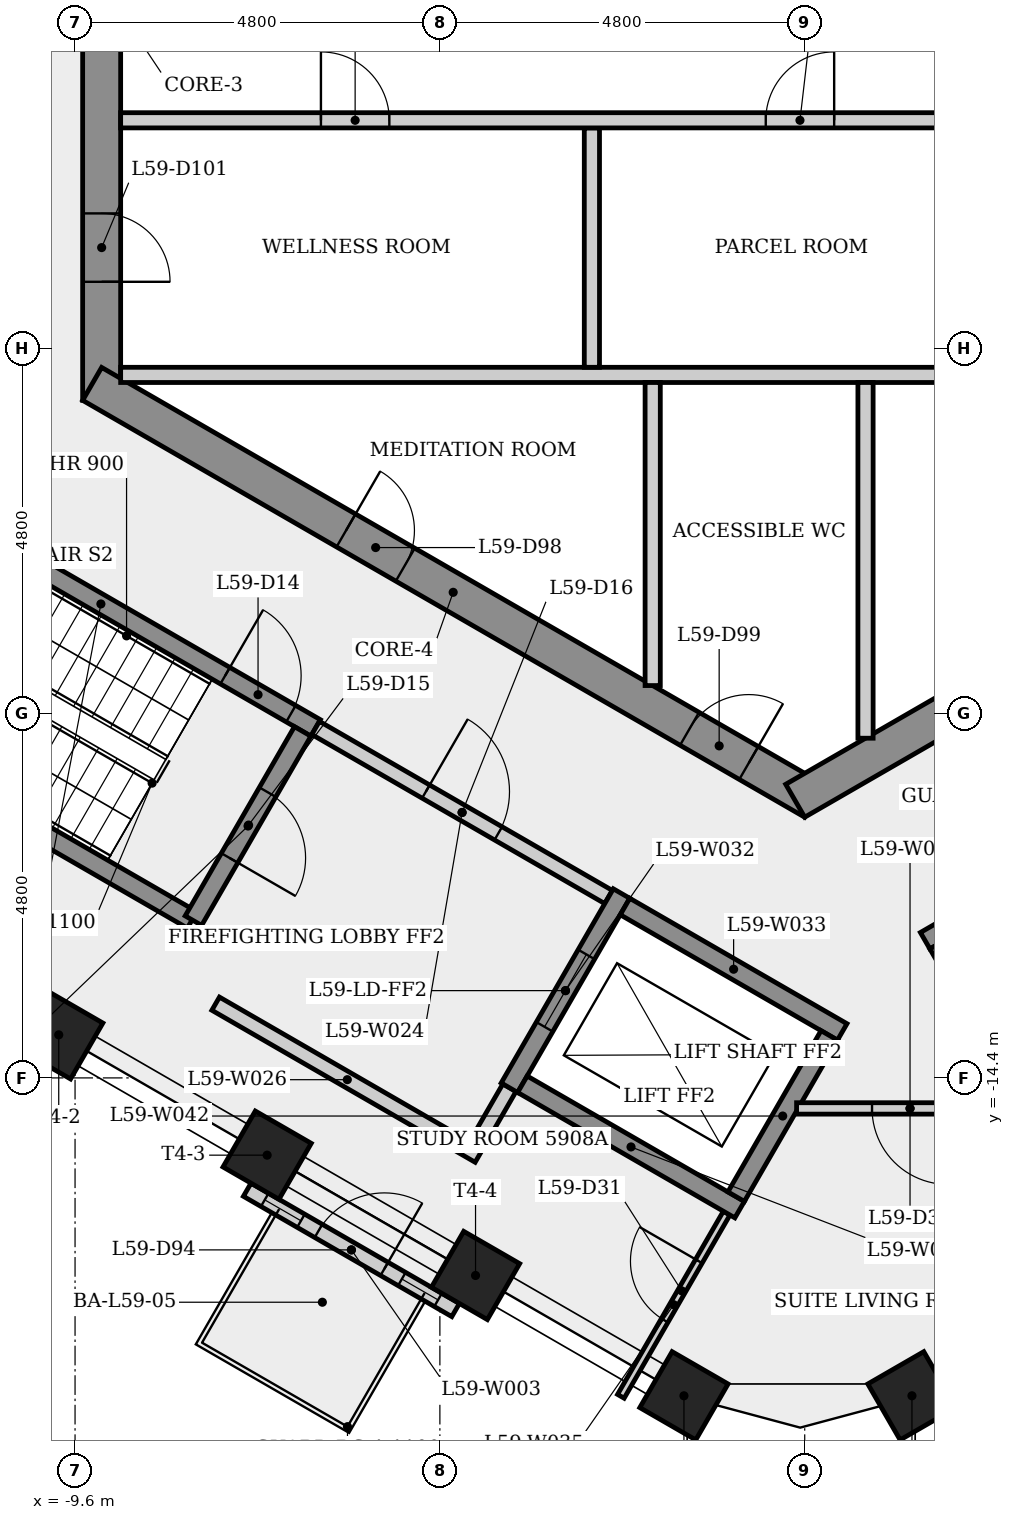
"""IFC4 building model, lengths in metres.
Left out: names, types, materials, properties, quantities, classifications, styles, units other than length and angle.
Written with IfcOpenShell. Run it as: python <this file> out.ifc"""

import sys

from ifc_helpers import new_model, si_unit, direction, frame, frame_2d, origin, origin_2d, place, context, subcontext, project, spatial, rectangle, extrude, element, fill, save


model = new_model("IFC4")
c1 = context("Model", 3, precision=1e-05, world=origin(), true_north=direction((0.0, 1.0)))
c2 = subcontext(c1, "Body", "Model", "MODEL_VIEW")
j1 = project(units=[si_unit("LENGTHUNIT", "METRE"), si_unit("PLANEANGLEUNIT", "RADIAN")], contexts=[c1])
p1 = place(None, origin())
s1 = spatial("IfcSite", under=j1, at=p1, CompositionType="ELEMENT")
p2 = place(p1, origin())
s2 = spatial("IfcBuilding", under=s1, at=p2, CompositionType="ELEMENT")
p3 = place(p2, frame((0.0, 0.0, 222.3)))
s3 = spatial("IfcBuildingStorey", under=s2, at=p3, CompositionType="ELEMENT", Elevation=222.3)
p4 = place(p3, frame((-9.25, 5.485, 0.0), z_axis=(0.0, 0.0, 1.0), x_axis=(0.0, -1.0, 0.0)))
e1 = element("IfcWall", 1, at=p4, inside=s3, PredefinedType="SHEAR", context=c2, shape_type="SweptSolid", body=[
    extrude(rectangle(XDim=10.97, YDim=0.5, at=frame_2d((5.485, 0.0))), origin(), (0.0, 0.0, 1.0), 3.4),
])
p5 = place(p4, frame((8.51, 0.0, 0.0)))
e2 = element("IfcOpeningElement", 2, at=p5, cuts=e1, PredefinedType="OPENING", context=c2, shape_type="SweptSolid", body=[
    extrude(rectangle(XDim=0.9, YDim=2.1, at=frame_2d((0.45, 1.05))), frame((0.0, 0.26, 0.0), z_axis=(0.0, -1.0, 0.0), x_axis=(1.0, 0.0, 0.0)), (0.0, 0.0, 1.0), 0.52),
])
p6 = place(p4, frame((4.685, 0.0, 0.0)))
e3 = element("IfcOpeningElement", 3, at=p6, cuts=e1, PredefinedType="OPENING", context=c2, shape_type="SweptSolid", body=[
    extrude(rectangle(XDim=1.6, YDim=2.1, at=frame_2d((0.8, 1.05))), frame((0.0, 0.26, 0.0), z_axis=(0.0, -1.0, 0.0), x_axis=(1.0, 0.0, 0.0)), (0.0, 0.0, 1.0), 0.52),
])
p7 = place(p3, frame((-9.375, -5.268, 0.0), z_axis=(0.0, 0.0, 1.0), x_axis=(0.866023993627, -0.500002442456, 0.0)))
e4 = element("IfcWall", 4, at=p7, inside=s3, PredefinedType="SHEAR", context=c2, shape_type="SweptSolid", body=[
    extrude(rectangle(XDim=10.97, YDim=0.5, at=frame_2d((5.485, 0.0))), origin(), (0.0, 0.0, 1.0), 3.4),
])
p8 = place(p7, frame((3.857, 0.0, 0.0)))
e5 = element("IfcOpeningElement", 5, at=p8, cuts=e4, PredefinedType="OPENING", context=c2, shape_type="SweptSolid", body=[
    extrude(rectangle(XDim=0.9, YDim=2.1, at=frame_2d((0.45, 1.05))), frame((0.0, 0.26, 0.0), z_axis=(0.0, -1.0, 0.0), x_axis=(1.0, 0.0, 0.0)), (0.0, 0.0, 1.0), 0.52),
])
p9 = place(p7, frame((9.076, 0.0, 0.0)))
e6 = element("IfcOpeningElement", 6, at=p9, cuts=e4, PredefinedType="OPENING", context=c2, shape_type="SweptSolid", body=[
    extrude(rectangle(XDim=0.9, YDim=2.1, at=frame_2d((0.45, 1.05))), frame((0.0, 0.26, 0.0), z_axis=(0.0, -1.0, 0.0), x_axis=(1.0, 0.0, 0.0)), (0.0, 0.0, 1.0), 0.52),
])
p10 = place(p3, frame((-0.125, -10.753, 0.0), z_axis=(0.0, 0.0, 1.0), x_axis=(0.866023993627, 0.500002442456, 0.0)))
e7 = element("IfcWall", 7, at=p10, inside=s3, PredefinedType="SHEAR", context=c2, shape_type="SweptSolid", body=[
    extrude(rectangle(XDim=10.97, YDim=0.5, at=frame_2d((5.485, 0.0))), origin(), (0.0, 0.0, 1.0), 3.4),
])
p11 = place(p10, frame((7.195, 0.0, 0.0)))
e8 = element("IfcOpeningElement", 8, at=p11, cuts=e7, PredefinedType="OPENING", context=c2, shape_type="SweptSolid", body=[
    extrude(rectangle(XDim=0.9, YDim=2.1, at=frame_2d((0.45, 1.05))), frame((0.0, 0.26, 0.0), z_axis=(0.0, -1.0, 0.0), x_axis=(1.0, 0.0, 0.0)), (0.0, 0.0, 1.0), 0.52),
])
for number, where, z_axis, x_axis in (
    (9, (-9.815, -13.833, 0.0), (0.0, 0.0, 1.0), (-0.5, -0.866, 0.0)),
    (10, (-7.073, -15.417, 0.0), (0.0, 0.0, 1.0), (-0.5, -0.866, 0.0)),
    (11, (-4.331, -17.0, 0.0), (0.0, 0.0, 1.0), (-0.5, -0.866, 0.0)),
    (12, (-1.589, -18.583, 0.0), (0.0, 0.0, 1.0), (-0.5, -0.866, 0.0)),
    (13, (1.411, -18.583, 0.0), (0.0, 0.0, 1.0), (0.5, -0.866, 0.0)),
):
    element("IfcColumn", number, at=place(p3, frame(where, z_axis=z_axis, x_axis=x_axis)), inside=s3, PredefinedType="COLUMN", context=c2, shape_type="SweptSolid", body=[
        extrude(rectangle(XDim=0.85, YDim=0.85, at=origin_2d()), origin(), (0.0, 0.0, 1.0), 3.4),
    ])
p12 = place(p3, frame((-7.335, -15.871, 0.0), z_axis=(0.0, 0.0, 1.0), x_axis=(0.866032778651, -0.499987226139, 0.0)))
e14 = element("IfcWall", 14, at=p12, inside=s3, PredefinedType="SOLIDWALL", context=c2, shape_type="SweptSolid", body=[
    extrude(rectangle(XDim=3.166, YDim=0.2, at=frame_2d((1.583, 0.0))), origin(), (0.0, 0.0, 1.0), 3.4),
])
p13 = place(p12, frame((1.083, 0.0, 0.0)))
e15 = element("IfcOpeningElement", 15, at=p13, cuts=e14, PredefinedType="OPENING", context=c2, shape_type="SweptSolid", body=[
    extrude(rectangle(XDim=1.0, YDim=2.4, at=frame_2d((0.5, 1.2))), frame((0.0, 0.11, 0.0), z_axis=(0.0, -1.0, 0.0), x_axis=(1.0, 0.0, 0.0)), (0.0, 0.0, 1.0), 0.22),
])
p14 = place(p12, frame((0.267, 0.0, 0.9)))
e16 = element("IfcOpeningElement", 16, at=p14, cuts=e14, PredefinedType="OPENING", context=c2, shape_type="SweptSolid", body=[
    extrude(rectangle(XDim=0.55, YDim=1.5, at=frame_2d((0.275, 0.75))), frame((0.0, 0.11, 0.0), z_axis=(0.0, -1.0, 0.0), x_axis=(1.0, 0.0, 0.0)), (0.0, 0.0, 1.0), 0.22),
])
p15 = place(p12, frame((2.35, 0.0, 0.9)))
e17 = element("IfcOpeningElement", 17, at=p15, cuts=e14, PredefinedType="OPENING", context=c2, shape_type="SweptSolid", body=[
    extrude(rectangle(XDim=0.55, YDim=1.5, at=frame_2d((0.275, 0.75))), frame((0.0, 0.11, 0.0), z_axis=(0.0, -1.0, 0.0), x_axis=(1.0, 0.0, 0.0)), (0.0, 0.0, 1.0), 0.22),
])
p16 = place(p3, frame((-12.085, -6.532, 0.0), z_axis=(0.0, 0.0, 1.0), x_axis=(0.866031063448, -0.499990197047, 0.0)))
e18 = element("IfcWall", 18, at=p16, inside=s3, PredefinedType="SHEAR", context=c2, shape_type="SweptSolid", body=[
    extrude(rectangle(XDim=6.525, YDim=0.25, at=frame_2d((3.263, 0.0))), origin(), (0.0, 0.0, 1.0), 3.05),
])
p17 = place(p16, frame((5.15, 0.0, 0.0)))
e19 = element("IfcOpeningElement", 19, at=p17, cuts=e18, PredefinedType="OPENING", context=c2, shape_type="SweptSolid", body=[
    extrude(rectangle(XDim=1.0, YDim=2.1, at=frame_2d((0.5, 1.05))), frame((0.0, 0.135, 0.0), z_axis=(0.0, -1.0, 0.0), x_axis=(1.0, 0.0, 0.0)), (0.0, 0.0, 1.0), 0.27),
])
p18 = place(p3, frame((-9.0, -5.15, 0.0), z_axis=(0.0, 0.0, 1.0), x_axis=(1.0, 0.0, 0.0)))
e20 = element("IfcWall", 20, at=p18, inside=s3, PredefinedType="PARTITIONING", context=c2, shape_type="SweptSolid", body=[
    extrude(rectangle(XDim=11.325, YDim=0.2, at=frame_2d((5.663, 0.0))), origin(), (0.0, 0.0, 1.0), 3.05),
])
p19 = place(p3, frame((-8.06, -12.321, 0.0), z_axis=(0.0, 0.0, 1.0), x_axis=(-0.866029591389, 0.499992746786, 0.0)))
e21 = element("IfcWall", 21, at=p19, inside=s3, PredefinedType="SHEAR", context=c2, shape_type="SweptSolid", body=[
    extrude(rectangle(XDim=6.255, YDim=0.25, at=frame_2d((3.127, 0.0))), origin(), (0.0, 0.0, 1.0), 3.05),
])
p20 = place(p3, frame((-6.605, -9.841, 0.0), z_axis=(0.0, 0.0, 1.0), x_axis=(-0.500011588718, -0.866018712932, 0.0)))
e22 = element("IfcWall", 22, at=p20, inside=s3, PredefinedType="SHEAR", context=c2, shape_type="SweptSolid", body=[
    extrude(rectangle(XDim=2.875, YDim=0.25, at=frame_2d((1.438, 0.0))), origin(), (0.0, 0.0, 1.0), 3.05),
])
p21 = place(p20, frame((0.923, 0.0, 0.0)))
e23 = element("IfcOpeningElement", 23, at=p21, cuts=e22, PredefinedType="OPENING", context=c2, shape_type="SweptSolid", body=[
    extrude(rectangle(XDim=1.0, YDim=2.1, at=frame_2d((0.5, 1.05))), frame((0.0, 0.135, 0.0), z_axis=(0.0, -1.0, 0.0), x_axis=(1.0, 0.0, 0.0)), (0.0, 0.0, 1.0), 0.27),
])
p22 = place(p3, frame((-6.435, -9.795, 0.0), z_axis=(0.0, 0.0, 1.0), x_axis=(0.866012907634, -0.500021643343, 0.0)))
e24 = element("IfcWall", 24, at=p22, inside=s3, PredefinedType="PARTITIONING", context=c2, shape_type="SweptSolid", body=[
    extrude(rectangle(XDim=4.45, YDim=0.2, at=frame_2d((2.225, 0.0))), origin(), (0.0, 0.0, 1.0), 3.05),
])
p23 = place(p22, frame((1.675, 0.0, 0.0)))
e25 = element("IfcOpeningElement", 25, at=p23, cuts=e24, PredefinedType="OPENING", context=c2, shape_type="SweptSolid", body=[
    extrude(rectangle(XDim=1.1, YDim=2.1, at=frame_2d((0.55, 1.05))), frame((0.0, 0.11, 0.0), z_axis=(0.0, -1.0, 0.0), x_axis=(1.0, 0.0, 0.0)), (0.0, 0.0, 1.0), 0.22),
])
p24 = place(p3, frame((-4.286, -15.423, 0.0), z_axis=(0.0, 0.0, 1.0), x_axis=(-0.866026010844, 0.49999894854, 0.0)))
e26 = element("IfcWall", 26, at=p24, inside=s3, PredefinedType="PARTITIONING", context=c2, shape_type="SweptSolid", body=[
    extrude(rectangle(XDim=4.0, YDim=0.2, at=frame_2d((2.0, 0.0))), origin(), (0.0, 0.0, 1.0), 3.05),
])
p25 = place(p3, frame((-3.885, -14.529, 0.0), z_axis=(0.0, 0.0, 1.0), x_axis=(-0.499859285417, -0.866106630146, 0.0)))
e27 = element("IfcWall", 27, at=p25, inside=s3, PredefinedType="PARTITIONING", context=c2, shape_type="SweptSolid", body=[
    extrude(rectangle(XDim=0.875, YDim=0.2, at=frame_2d((0.438, 0.0))), origin(), (0.0, 0.0, 1.0), 3.05),
])
p26 = place(p3, frame((-2.8, -1.9, 0.0), z_axis=(0.0, 0.0, 1.0), x_axis=(0.0, -1.0, 0.0)))
e28 = element("IfcWall", 28, at=p26, inside=s3, PredefinedType="PARTITIONING", context=c2, shape_type="SweptSolid", body=[
    extrude(rectangle(XDim=3.15, YDim=0.2, at=frame_2d((1.575, 0.0))), origin(), (0.0, 0.0, 1.0), 3.05),
])
p27 = place(p3, frame((-9.0, -1.8, 0.0), z_axis=(0.0, 0.0, 1.0), x_axis=(1.0, 0.0, 0.0)))
e29 = element("IfcWall", 29, at=p27, inside=s3, PredefinedType="PARTITIONING", context=c2, shape_type="SweptSolid", body=[
    extrude(rectangle(XDim=11.325, YDim=0.2, at=frame_2d((5.663, 0.0))), origin(), (0.0, 0.0, 1.0), 3.05),
])
p28 = place(p27, frame((2.635, 0.0, 0.0)))
e30 = element("IfcOpeningElement", 30, at=p28, cuts=e29, PredefinedType="OPENING", context=c2, shape_type="SweptSolid", body=[
    extrude(rectangle(XDim=0.9, YDim=2.1, at=frame_2d((0.45, 1.05))), frame((0.0, 0.11, 0.0), z_axis=(0.0, -1.0, 0.0), x_axis=(1.0, 0.0, 0.0)), (0.0, 0.0, 1.0), 0.22),
])
p29 = place(p27, frame((8.488, 0.0, 0.0)))
e31 = element("IfcOpeningElement", 31, at=p29, cuts=e29, PredefinedType="OPENING", context=c2, shape_type="SweptSolid", body=[
    extrude(rectangle(XDim=0.9, YDim=2.1, at=frame_2d((0.45, 1.05))), frame((0.0, 0.11, 0.0), z_axis=(0.0, -1.0, 0.0), x_axis=(1.0, 0.0, 0.0)), (0.0, 0.0, 1.0), 0.22),
])
p30 = place(p3, frame((-2.41, -11.974, 0.0), z_axis=(0.0, 0.0, 1.0), x_axis=(-0.500001826776, -0.866024349092, 0.0)))
e32 = element("IfcWall", 32, at=p30, inside=s3, PredefinedType="SHEAR", context=c2, shape_type="SweptSolid", body=[
    extrude(rectangle(XDim=2.95, YDim=0.25, at=frame_2d((1.475, 0.0))), origin(), (0.0, 0.0, 1.0), 3.05),
])
p31 = place(p30, frame((0.925, 0.0, 0.0)))
e33 = element("IfcOpeningElement", 33, at=p31, cuts=e32, PredefinedType="OPENING", context=c2, shape_type="SweptSolid", body=[
    extrude(rectangle(XDim=1.1, YDim=2.1, at=frame_2d((0.55, 1.05))), frame((0.0, 0.135, 0.0), z_axis=(0.0, -1.0, 0.0), x_axis=(1.0, 0.0, 0.0)), (0.0, 0.0, 1.0), 0.27),
])
p32 = place(p3, frame((-2.364, -12.145, 0.0), z_axis=(0.0, 0.0, 1.0), x_axis=(0.866040211805, -0.499974350878, 0.0)))
e34 = element("IfcWall", 34, at=p32, inside=s3, PredefinedType="SHEAR", context=c2, shape_type="SweptSolid", body=[
    extrude(rectangle(XDim=3.3, YDim=0.25, at=frame_2d((1.65, 0.0))), origin(), (0.0, 0.0, 1.0), 3.05),
])
p33 = place(p3, frame((-2.419, -18.59, 0.0), z_axis=(0.0, 0.0, 1.0), x_axis=(0.500016013541, 0.866016158165, 0.0)))
e35 = element("IfcWall", 35, at=p33, inside=s3, PredefinedType="PARTITIONING", context=c2, shape_type="SweptSolid", body=[
    extrude(rectangle(XDim=2.784, YDim=0.1, at=frame_2d((1.392, 0.0))), origin(), (0.0, 0.0, 1.0), 3.05),
])
p34 = place(p33, frame((1.152, 0.0, 0.0)))
e36 = element("IfcOpeningElement", 36, at=p34, cuts=e35, PredefinedType="OPENING", context=c2, shape_type="SweptSolid", body=[
    extrude(rectangle(XDim=0.9, YDim=2.1, at=frame_2d((0.45, 1.05))), frame((0.0, 0.06, 0.0), z_axis=(0.0, -1.0, 0.0), x_axis=(1.0, 0.0, 0.0)), (0.0, 0.0, 1.0), 0.12),
])
p35 = place(p3, frame((-2.0, -5.25, 0.0), z_axis=(0.0, 0.0, 1.0), x_axis=(0.0, -1.0, 0.0)))
e37 = element("IfcWall", 37, at=p35, inside=s3, PredefinedType="PARTITIONING", context=c2, shape_type="SweptSolid", body=[
    extrude(rectangle(XDim=3.988, YDim=0.2, at=frame_2d((1.994, 0.0))), origin(), (0.0, 0.0, 1.0), 3.05),
])
p36 = place(p3, frame((-0.856, -16.133, 0.0), z_axis=(0.0, 0.0, 1.0), x_axis=(-0.866021716278, 0.500006386895, 0.0)))
e38 = element("IfcWall", 38, at=p36, inside=s3, PredefinedType="SHEAR", context=c2, shape_type="SweptSolid", body=[
    extrude(rectangle(XDim=3.3, YDim=0.25, at=frame_2d((1.65, 0.0))), origin(), (0.0, 0.0, 1.0), 3.05),
])
p37 = place(p3, frame((-0.902, -15.962, 0.0), z_axis=(0.0, 0.0, 1.0), x_axis=(0.500061746146, 0.865989751695, 0.0)))
e39 = element("IfcWall", 39, at=p37, inside=s3, PredefinedType="SHEAR", context=c2, shape_type="SweptSolid", body=[
    extrude(rectangle(XDim=2.45, YDim=0.25, at=frame_2d((1.225, 0.0))), origin(), (0.0, 0.0, 1.0), 3.4),
])
p38 = place(p3, frame((0.8, -5.25, 0.0), z_axis=(0.0, 0.0, 1.0), x_axis=(0.0, -1.0, 0.0)))
e40 = element("IfcWall", 40, at=p38, inside=s3, PredefinedType="PARTITIONING", context=c2, shape_type="SweptSolid", body=[
    extrude(rectangle(XDim=4.68, YDim=0.2, at=frame_2d((2.34, 0.0))), origin(), (0.0, 0.0, 1.0), 3.05),
])
p39 = place(p3, frame((1.585, -12.595, 0.0), z_axis=(0.0, 0.0, 1.0), x_axis=(0.866036417653, 0.499980922934, 0.0)))
e41 = element("IfcWall", 41, at=p39, inside=s3, PredefinedType="SHEAR", context=c2, shape_type="SweptSolid", body=[
    extrude(rectangle(XDim=6.65, YDim=0.25, at=frame_2d((3.325, 0.0))), origin(), (0.0, 0.0, 1.0), 3.05),
])
p40 = place(p39, frame((5.275, 0.0, 0.0)))
e42 = element("IfcOpeningElement", 42, at=p40, cuts=e41, PredefinedType="OPENING", context=c2, shape_type="SweptSolid", body=[
    extrude(rectangle(XDim=1.0, YDim=2.1, at=frame_2d((0.5, 1.05))), frame((0.0, 0.135, 0.0), z_axis=(0.0, -1.0, 0.0), x_axis=(1.0, 0.0, 0.0)), (0.0, 0.0, 1.0), 0.27),
])
p41 = place(p3, frame((2.878, -14.802, 0.0), z_axis=(0.0, 0.0, 1.0), x_axis=(-1.0, 0.0, 0.0)))
e43 = element("IfcWall", 43, at=p41, inside=s3, PredefinedType="PARTITIONING", context=c2, shape_type="SweptSolid", body=[
    extrude(rectangle(XDim=2.985, YDim=0.15, at=frame_2d((1.493, 0.0))), origin(), (0.0, 0.0, 1.0), 3.05),
])
p42 = place(p41, frame((0.992, 0.0, 0.0)))
e44 = element("IfcOpeningElement", 44, at=p42, cuts=e43, PredefinedType="OPENING", context=c2, shape_type="SweptSolid", body=[
    extrude(rectangle(XDim=1.0, YDim=2.1, at=frame_2d((0.5, 1.05))), frame((0.0, 0.085, 0.0), z_axis=(0.0, -1.0, 0.0), x_axis=(1.0, 0.0, 0.0)), (0.0, 0.0, 1.0), 0.17),
])
p43 = place(p3, frame((1.756, -12.641, 0.0), z_axis=(0.0, 0.0, 1.0), x_axis=(0.50002537861, -0.866010750942, 0.0)))
e45 = element("IfcWall", 45, at=p43, inside=s3, PredefinedType="SHEAR", context=c2, shape_type="SweptSolid", body=[
    extrude(rectangle(XDim=3.0, YDim=0.25, at=frame_2d((1.5, 0.0))), origin(), (0.0, 0.0, 1.0), 3.05),
])
p44 = place(p13, origin())
e46 = element("IfcDoor", 46, at=p44, inside=s3, OperationType="SINGLE_SWING_RIGHT", PredefinedType="DOOR", context=c2, shape_type="SweptSolid", body=[
    extrude(rectangle(XDim=1.0, YDim=2.4, at=frame_2d((0.5, 1.2))), frame((0.0, 0.025, 0.0), z_axis=(0.0, -1.0, 0.0), x_axis=(1.0, 0.0, 0.0)), (0.0, 0.0, 1.0), 0.05),
])
fill(e15, e46)
p45 = place(p14, origin())
e47 = element("IfcWindow", 47, at=p45, inside=s3, PartitioningType="SINGLE_PANEL", PredefinedType="WINDOW", context=c2, shape_type="SweptSolid", body=[
    extrude(rectangle(XDim=0.55, YDim=1.5, at=frame_2d((0.275, 0.75))), frame((0.0, 0.03, 0.0), z_axis=(0.0, -1.0, 0.0), x_axis=(1.0, 0.0, 0.0)), (0.0, 0.0, 1.0), 0.06),
])
fill(e16, e47)
p46 = place(p15, origin())
e48 = element("IfcWindow", 48, at=p46, inside=s3, PartitioningType="SINGLE_PANEL", PredefinedType="WINDOW", context=c2, shape_type="SweptSolid", body=[
    extrude(rectangle(XDim=0.55, YDim=1.5, at=frame_2d((0.275, 0.75))), frame((0.0, 0.03, 0.0), z_axis=(0.0, -1.0, 0.0), x_axis=(1.0, 0.0, 0.0)), (0.0, 0.0, 1.0), 0.06),
])
fill(e17, e48)
p47 = place(p28, origin())
e49 = element("IfcDoor", 49, at=p47, inside=s3, OperationType="SINGLE_SWING_LEFT", PredefinedType="DOOR", context=c2, shape_type="SweptSolid", body=[
    extrude(rectangle(XDim=0.9, YDim=2.1, at=frame_2d((0.45, 1.05))), frame((0.0, 0.025, 0.0), z_axis=(0.0, -1.0, 0.0), x_axis=(1.0, 0.0, 0.0)), (0.0, 0.0, 1.0), 0.05),
])
fill(e30, e49)
p48 = place(p29, origin())
e50 = element("IfcDoor", 50, at=p48, inside=s3, OperationType="SINGLE_SWING_RIGHT", PredefinedType="DOOR", context=c2, shape_type="SweptSolid", body=[
    extrude(rectangle(XDim=0.9, YDim=2.1, at=frame_2d((0.45, 1.05))), frame((0.0, 0.025, 0.0), z_axis=(0.0, -1.0, 0.0), x_axis=(1.0, 0.0, 0.0)), (0.0, 0.0, 1.0), 0.05),
])
fill(e31, e50)
p49 = place(p17, origin())
e51 = element("IfcDoor", 51, at=p49, inside=s3, OperationType="SINGLE_SWING_LEFT", PredefinedType="DOOR", context=c2, shape_type="SweptSolid", body=[
    extrude(rectangle(XDim=1.0, YDim=2.1, at=frame_2d((0.5, 1.05))), frame((0.0, 0.025, 0.0), z_axis=(0.0, -1.0, 0.0), x_axis=(1.0, 0.0, 0.0)), (0.0, 0.0, 1.0), 0.05),
])
fill(e19, e51)
p50 = place(p21, origin())
e52 = element("IfcDoor", 52, at=p50, inside=s3, OperationType="SINGLE_SWING_RIGHT", PredefinedType="DOOR", context=c2, shape_type="SweptSolid", body=[
    extrude(rectangle(XDim=1.0, YDim=2.1, at=frame_2d((0.5, 1.05))), frame((0.0, 0.025, 0.0), z_axis=(0.0, -1.0, 0.0), x_axis=(1.0, 0.0, 0.0)), (0.0, 0.0, 1.0), 0.05),
])
fill(e23, e52)
p51 = place(p23, origin())
e53 = element("IfcDoor", 53, at=p51, inside=s3, OperationType="SINGLE_SWING_LEFT", PredefinedType="DOOR", context=c2, shape_type="SweptSolid", body=[
    extrude(rectangle(XDim=1.1, YDim=2.1, at=frame_2d((0.55, 1.05))), frame((0.0, 0.025, 0.0), z_axis=(0.0, -1.0, 0.0), x_axis=(1.0, 0.0, 0.0)), (0.0, 0.0, 1.0), 0.05),
])
fill(e25, e53)
p52 = place(p31, origin())
e54 = element("IfcDoor", 54, at=p52, inside=s3, OperationType="SLIDING_TO_LEFT", PredefinedType="DOOR", context=c2, shape_type="SweptSolid", body=[
    extrude(rectangle(XDim=1.1, YDim=2.1, at=frame_2d((0.55, 1.05))), frame((0.0, 0.025, 0.0), z_axis=(0.0, -1.0, 0.0), x_axis=(1.0, 0.0, 0.0)), (0.0, 0.0, 1.0), 0.05),
])
fill(e33, e54)
p53 = place(p42, origin())
e55 = element("IfcDoor", 55, at=p53, inside=s3, OperationType="SINGLE_SWING_LEFT", PredefinedType="DOOR", context=c2, shape_type="SweptSolid", body=[
    extrude(rectangle(XDim=1.0, YDim=2.1, at=frame_2d((0.5, 1.05))), frame((0.0, 0.025, 0.0), z_axis=(0.0, -1.0, 0.0), x_axis=(1.0, 0.0, 0.0)), (0.0, 0.0, 1.0), 0.05),
])
fill(e44, e55)
p54 = place(p34, origin())
e56 = element("IfcDoor", 56, at=p54, inside=s3, OperationType="SINGLE_SWING_RIGHT", PredefinedType="DOOR", context=c2, shape_type="SweptSolid", body=[
    extrude(rectangle(XDim=0.9, YDim=2.1, at=frame_2d((0.45, 1.05))), frame((0.0, 0.025, 0.0), z_axis=(0.0, -1.0, 0.0), x_axis=(1.0, 0.0, 0.0)), (0.0, 0.0, 1.0), 0.05),
])
fill(e36, e56)
p55 = place(p8, origin())
e57 = element("IfcDoor", 57, at=p55, inside=s3, OperationType="SINGLE_SWING_LEFT", PredefinedType="DOOR", context=c2, shape_type="SweptSolid", body=[
    extrude(rectangle(XDim=0.9, YDim=2.1, at=frame_2d((0.45, 1.05))), frame((0.0, 0.025, 0.0), z_axis=(0.0, -1.0, 0.0), x_axis=(1.0, 0.0, 0.0)), (0.0, 0.0, 1.0), 0.05),
])
fill(e5, e57)
p56 = place(p9, origin())
e58 = element("IfcDoor", 58, at=p56, inside=s3, OperationType="SINGLE_SWING_RIGHT", PredefinedType="DOOR", context=c2, shape_type="SweptSolid", body=[
    extrude(rectangle(XDim=0.9, YDim=2.1, at=frame_2d((0.45, 1.05))), frame((0.0, 0.025, 0.0), z_axis=(0.0, -1.0, 0.0), x_axis=(1.0, 0.0, 0.0)), (0.0, 0.0, 1.0), 0.05),
])
fill(e6, e58)
p57 = place(p5, origin())
e59 = element("IfcDoor", 59, at=p57, inside=s3, OperationType="SINGLE_SWING_RIGHT", PredefinedType="DOOR", context=c2, shape_type="SweptSolid", body=[
    extrude(rectangle(XDim=0.9, YDim=2.1, at=frame_2d((0.45, 1.05))), frame((0.0, 0.025, 0.0), z_axis=(0.0, -1.0, 0.0), x_axis=(1.0, 0.0, 0.0)), (0.0, 0.0, 1.0), 0.05),
])
fill(e2, e59)
save(model, sys.argv[1])
